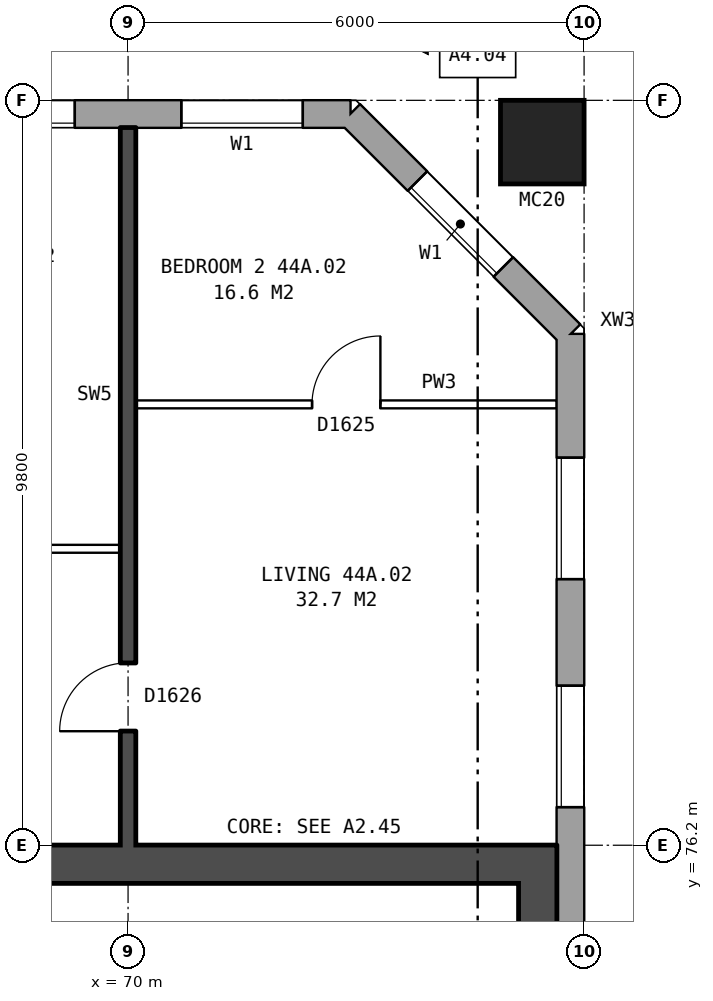
"""IFC4 building model, lengths in metres.
Left out: names, types, materials, properties, quantities, classifications, styles, units other than length and angle.
Written with IfcOpenShell. Run it as: python <this file> out.ifc"""

import sys

from ifc_helpers import new_model, si_unit, direction, frame, frame_2d, origin, origin_2d, place, context, subcontext, project, spatial, rectangle, hollow_rectangle, extrude, element, fill, save


model = new_model("IFC4")
c1 = context("Model", 3, precision=1e-05, world=origin(), true_north=direction((0.0, 1.0)))
c2 = subcontext(c1, "Body", "Model", "MODEL_VIEW")
j1 = project(units=[si_unit("LENGTHUNIT", "METRE"), si_unit("PLANEANGLEUNIT", "RADIAN")], contexts=[c1])
p1 = place(None, origin())
s1 = spatial("IfcSite", under=j1, at=p1, CompositionType="ELEMENT")
p2 = place(p1, origin())
s2 = spatial("IfcBuilding", under=s1, at=p2, CompositionType="ELEMENT")
p3 = place(p2, frame((0.0, 0.0, 157.8)))
s3 = spatial("IfcBuildingStorey", under=s2, at=p3, CompositionType="ELEMENT", Elevation=157.8)
p4 = place(p3, frame((75.45, 85.45, 0.0), z_axis=(0.0, 0.0, 1.0), x_axis=(1.0, 0.0, 0.0)))
e1 = element("IfcColumn", 1, at=p4, inside=s3, PredefinedType="COLUMN", context=c2, shape_type="SweptSolid", body=[
    extrude(hollow_rectangle(XDim=1.1, YDim=1.1, WallThickness=0.06, at=origin_2d()), origin(), (0.0, 0.0, 1.0), 3.1),
])
p5 = place(p3, frame((75.82, 57.075, 0.0), z_axis=(0.0, 0.0, 1.0), x_axis=(0.0, 1.0, 0.0)))
e2 = element("IfcWall", 2, at=p5, inside=s3, PredefinedType="STANDARD", context=c2, shape_type="SweptSolid", body=[
    extrude(rectangle(XDim=25.851, YDim=0.36, at=frame_2d((12.925, 0.0))), origin(), (0.0, 0.0, 1.0), 2.85),
])
p6 = place(p5, frame((1.625, 0.0, 0.8)))
e3 = element("IfcOpeningElement", 3, at=p6, cuts=e2, PredefinedType="OPENING", context=c2, shape_type="SweptSolid", body=[
    extrude(rectangle(XDim=1.6, YDim=1.8, at=frame_2d((0.8, 0.9))), frame((0.0, 0.19, 0.0), z_axis=(0.0, -1.0, 0.0), x_axis=(1.0, 0.0, 0.0)), (0.0, 0.0, 1.0), 0.38),
])
p7 = place(p5, frame((4.625, 0.0, 0.8)))
e4 = element("IfcOpeningElement", 4, at=p7, cuts=e2, PredefinedType="OPENING", context=c2, shape_type="SweptSolid", body=[
    extrude(rectangle(XDim=1.6, YDim=1.8, at=frame_2d((0.8, 0.9))), frame((0.0, 0.19, 0.0), z_axis=(0.0, -1.0, 0.0), x_axis=(1.0, 0.0, 0.0)), (0.0, 0.0, 1.0), 0.38),
])
p8 = place(p5, frame((19.625, 0.0, 0.8)))
e5 = element("IfcOpeningElement", 5, at=p8, cuts=e2, PredefinedType="OPENING", context=c2, shape_type="SweptSolid", body=[
    extrude(rectangle(XDim=1.6, YDim=1.8, at=frame_2d((0.8, 0.9))), frame((0.0, 0.19, 0.0), z_axis=(0.0, -1.0, 0.0), x_axis=(1.0, 0.0, 0.0)), (0.0, 0.0, 1.0), 0.38),
])
p9 = place(p5, frame((22.625, 0.0, 0.8)))
e6 = element("IfcOpeningElement", 6, at=p9, cuts=e2, PredefinedType="OPENING", context=c2, shape_type="SweptSolid", body=[
    extrude(rectangle(XDim=1.6, YDim=1.8, at=frame_2d((0.8, 0.9))), frame((0.0, 0.19, 0.0), z_axis=(0.0, -1.0, 0.0), x_axis=(1.0, 0.0, 0.0)), (0.0, 0.0, 1.0), 0.38),
])
p10 = place(p3, frame((75.82, 82.925, 0.0), z_axis=(0.0, 0.0, 1.0), x_axis=(-0.707106781187, 0.707106781187, 0.0)))
e7 = element("IfcWall", 7, at=p10, inside=s3, PredefinedType="STANDARD", context=c2, shape_type="SweptSolid", body=[
    extrude(rectangle(XDim=4.094, YDim=0.36, at=frame_2d((2.047, 0.0))), origin(), (0.0, 0.0, 1.0), 2.85),
])
p11 = place(p10, frame((1.247, 0.0, 0.8)))
e8 = element("IfcOpeningElement", 8, at=p11, cuts=e7, PredefinedType="OPENING", context=c2, shape_type="SweptSolid", body=[
    extrude(rectangle(XDim=1.6, YDim=1.8, at=frame_2d((0.8, 0.9))), frame((0.0, 0.19, 0.0), z_axis=(0.0, -1.0, 0.0), x_axis=(1.0, 0.0, 0.0)), (0.0, 0.0, 1.0), 0.38),
])
p12 = place(p3, frame((72.925, 85.82, 0.0), z_axis=(0.0, 0.0, 1.0), x_axis=(-1.0, 0.0, 0.0)))
e9 = element("IfcWall", 9, at=p12, inside=s3, PredefinedType="STANDARD", context=c2, shape_type="SweptSolid", body=[
    extrude(rectangle(XDim=41.351, YDim=0.36, at=frame_2d((20.675, 0.0))), origin(), (0.0, 0.0, 1.0), 2.85),
])
p13 = place(p12, frame((0.625, 0.0, 0.8)))
e10 = element("IfcOpeningElement", 10, at=p13, cuts=e9, PredefinedType="OPENING", context=c2, shape_type="SweptSolid", body=[
    extrude(rectangle(XDim=1.6, YDim=1.8, at=frame_2d((0.8, 0.9))), frame((0.0, 0.19, 0.0), z_axis=(0.0, -1.0, 0.0), x_axis=(1.0, 0.0, 0.0)), (0.0, 0.0, 1.0), 0.38),
])
p14 = place(p12, frame((3.625, 0.0, 0.8)))
e11 = element("IfcOpeningElement", 11, at=p14, cuts=e9, PredefinedType="OPENING", context=c2, shape_type="SweptSolid", body=[
    extrude(rectangle(XDim=1.6, YDim=1.8, at=frame_2d((0.8, 0.9))), frame((0.0, 0.19, 0.0), z_axis=(0.0, -1.0, 0.0), x_axis=(1.0, 0.0, 0.0)), (0.0, 0.0, 1.0), 0.38),
])
p15 = place(p12, frame((6.625, 0.0, 0.8)))
e12 = element("IfcOpeningElement", 12, at=p15, cuts=e9, PredefinedType="OPENING", context=c2, shape_type="SweptSolid", body=[
    extrude(rectangle(XDim=1.6, YDim=1.8, at=frame_2d((0.8, 0.9))), frame((0.0, 0.19, 0.0), z_axis=(0.0, -1.0, 0.0), x_axis=(1.0, 0.0, 0.0)), (0.0, 0.0, 1.0), 0.38),
])
p16 = place(p12, frame((9.125, 0.0, 0.8)))
e13 = element("IfcOpeningElement", 13, at=p16, cuts=e9, PredefinedType="OPENING", context=c2, shape_type="SweptSolid", body=[
    extrude(rectangle(XDim=0.6, YDim=1.8, at=frame_2d((0.3, 0.9))), frame((0.0, 0.19, 0.0), z_axis=(0.0, -1.0, 0.0), x_axis=(1.0, 0.0, 0.0)), (0.0, 0.0, 1.0), 0.38),
])
p17 = place(p12, frame((12.125, 0.0, 0.8)))
e14 = element("IfcOpeningElement", 14, at=p17, cuts=e9, PredefinedType="OPENING", context=c2, shape_type="SweptSolid", body=[
    extrude(rectangle(XDim=0.8, YDim=0.9, at=frame_2d((0.4, 0.45))), frame((0.0, 0.19, 0.0), z_axis=(0.0, -1.0, 0.0), x_axis=(1.0, 0.0, 0.0)), (0.0, 0.0, 1.0), 0.38),
])
p18 = place(p12, frame((15.625, 0.0, 0.8)))
e15 = element("IfcOpeningElement", 15, at=p18, cuts=e9, PredefinedType="OPENING", context=c2, shape_type="SweptSolid", body=[
    extrude(rectangle(XDim=1.6, YDim=1.8, at=frame_2d((0.8, 0.9))), frame((0.0, 0.19, 0.0), z_axis=(0.0, -1.0, 0.0), x_axis=(1.0, 0.0, 0.0)), (0.0, 0.0, 1.0), 0.38),
])
p19 = place(p12, frame((18.625, 0.0, 0.8)))
e16 = element("IfcOpeningElement", 16, at=p19, cuts=e9, PredefinedType="OPENING", context=c2, shape_type="SweptSolid", body=[
    extrude(rectangle(XDim=1.6, YDim=1.8, at=frame_2d((0.8, 0.9))), frame((0.0, 0.19, 0.0), z_axis=(0.0, -1.0, 0.0), x_axis=(1.0, 0.0, 0.0)), (0.0, 0.0, 1.0), 0.38),
])
p20 = place(p12, frame((21.625, 0.0, 0.8)))
e17 = element("IfcOpeningElement", 17, at=p20, cuts=e9, PredefinedType="OPENING", context=c2, shape_type="SweptSolid", body=[
    extrude(rectangle(XDim=1.6, YDim=1.8, at=frame_2d((0.8, 0.9))), frame((0.0, 0.19, 0.0), z_axis=(0.0, -1.0, 0.0), x_axis=(1.0, 0.0, 0.0)), (0.0, 0.0, 1.0), 0.38),
])
p21 = place(p12, frame((24.625, 0.0, 0.8)))
e18 = element("IfcOpeningElement", 18, at=p21, cuts=e9, PredefinedType="OPENING", context=c2, shape_type="SweptSolid", body=[
    extrude(rectangle(XDim=1.6, YDim=1.8, at=frame_2d((0.8, 0.9))), frame((0.0, 0.19, 0.0), z_axis=(0.0, -1.0, 0.0), x_axis=(1.0, 0.0, 0.0)), (0.0, 0.0, 1.0), 0.38),
])
p22 = place(p12, frame((27.125, 0.0, 0.8)))
e19 = element("IfcOpeningElement", 19, at=p22, cuts=e9, PredefinedType="OPENING", context=c2, shape_type="SweptSolid", body=[
    extrude(rectangle(XDim=0.8, YDim=1.8, at=frame_2d((0.4, 0.9))), frame((0.0, 0.19, 0.0), z_axis=(0.0, -1.0, 0.0), x_axis=(1.0, 0.0, 0.0)), (0.0, 0.0, 1.0), 0.38),
])
p23 = place(p12, frame((28.225, 0.0, 0.8)))
e20 = element("IfcOpeningElement", 20, at=p23, cuts=e9, PredefinedType="OPENING", context=c2, shape_type="SweptSolid", body=[
    extrude(rectangle(XDim=1.0, YDim=0.9, at=frame_2d((0.5, 0.45))), frame((0.0, 0.19, 0.0), z_axis=(0.0, -1.0, 0.0), x_axis=(1.0, 0.0, 0.0)), (0.0, 0.0, 1.0), 0.38),
])
p24 = place(p12, frame((33.625, 0.0, 0.8)))
e21 = element("IfcOpeningElement", 21, at=p24, cuts=e9, PredefinedType="OPENING", context=c2, shape_type="SweptSolid", body=[
    extrude(rectangle(XDim=1.6, YDim=1.8, at=frame_2d((0.8, 0.9))), frame((0.0, 0.19, 0.0), z_axis=(0.0, -1.0, 0.0), x_axis=(1.0, 0.0, 0.0)), (0.0, 0.0, 1.0), 0.38),
])
p25 = place(p12, frame((36.625, 0.0, 0.8)))
e22 = element("IfcOpeningElement", 22, at=p25, cuts=e9, PredefinedType="OPENING", context=c2, shape_type="SweptSolid", body=[
    extrude(rectangle(XDim=1.6, YDim=1.8, at=frame_2d((0.8, 0.9))), frame((0.0, 0.19, 0.0), z_axis=(0.0, -1.0, 0.0), x_axis=(1.0, 0.0, 0.0)), (0.0, 0.0, 1.0), 0.38),
])
p26 = place(p12, frame((10.025, 0.0, 1.7)))
e23 = element("IfcOpeningElement", 23, at=p26, cuts=e9, PredefinedType="OPENING", context=c2, shape_type="SweptSolid", body=[
    extrude(rectangle(XDim=0.8, YDim=0.9, at=frame_2d((0.4, 0.45))), frame((0.0, 0.19, 0.0), z_axis=(0.0, -1.0, 0.0), x_axis=(1.0, 0.0, 0.0)), (0.0, 0.0, 1.0), 0.38),
])
p27 = place(p12, frame((13.275, 0.0, 0.8)))
e24 = element("IfcOpeningElement", 24, at=p27, cuts=e9, PredefinedType="OPENING", context=c2, shape_type="SweptSolid", body=[
    extrude(rectangle(XDim=1.4, YDim=1.8, at=frame_2d((0.7, 0.9))), frame((0.0, 0.19, 0.0), z_axis=(0.0, -1.0, 0.0), x_axis=(1.0, 0.0, 0.0)), (0.0, 0.0, 1.0), 0.38),
])
p28 = place(p12, frame((30.475, 0.0, 1.7)))
e25 = element("IfcOpeningElement", 25, at=p28, cuts=e9, PredefinedType="OPENING", context=c2, shape_type="SweptSolid", body=[
    extrude(rectangle(XDim=0.8, YDim=0.9, at=frame_2d((0.4, 0.45))), frame((0.0, 0.19, 0.0), z_axis=(0.0, -1.0, 0.0), x_axis=(1.0, 0.0, 0.0)), (0.0, 0.0, 1.0), 0.38),
])
p29 = place(p12, frame((31.625, 0.0, 0.8)))
e26 = element("IfcOpeningElement", 26, at=p29, cuts=e9, PredefinedType="OPENING", context=c2, shape_type="SweptSolid", body=[
    extrude(rectangle(XDim=1.0, YDim=1.8, at=frame_2d((0.5, 0.9))), frame((0.0, 0.19, 0.0), z_axis=(0.0, -1.0, 0.0), x_axis=(1.0, 0.0, 0.0)), (0.0, 0.0, 1.0), 0.38),
])
p30 = place(p3, frame((75.39, 63.8, 0.0), z_axis=(0.0, 0.0, 1.0), x_axis=(0.0, 1.0, 0.0)))
e27 = element("IfcWall", 27, at=p30, inside=s3, PredefinedType="SHEAR", context=c2, shape_type="SweptSolid", body=[
    extrude(rectangle(XDim=12.4, YDim=0.5, at=frame_2d((6.2, 0.0))), origin(), (0.0, 0.0, 1.0), 2.85),
])
p31 = place(p3, frame((67.14, 75.95, 0.0), z_axis=(0.0, 0.0, 1.0), x_axis=(1.0, 0.0, 0.0)))
e28 = element("IfcWall", 28, at=p31, inside=s3, PredefinedType="SHEAR", context=c2, shape_type="SweptSolid", body=[
    extrude(rectangle(XDim=8.0, YDim=0.5, at=frame_2d((4.0, 0.0))), origin(), (0.0, 0.0, 1.0), 2.85),
])
p32 = place(p3, frame((64.1, 80.1, 0.0), z_axis=(0.0, 0.0, 1.0), x_axis=(1.0, 0.0, 0.0)))
e29 = element("IfcWall", 29, at=p32, inside=s3, PredefinedType="PARTITIONING", context=c2, shape_type="SweptSolid", body=[
    extrude(rectangle(XDim=5.8, YDim=0.1, at=frame_2d((2.9, 0.0))), origin(), (0.0, 0.0, 1.0), 2.85),
])
p33 = place(p32, frame((3.6, 0.0, 0.0)))
e30 = element("IfcOpeningElement", 30, at=p33, cuts=e29, PredefinedType="OPENING", context=c2, shape_type="SweptSolid", body=[
    extrude(rectangle(XDim=0.9, YDim=2.1, at=frame_2d((0.45, 1.05))), frame((0.0, 0.06, 0.0), z_axis=(0.0, -1.0, 0.0), x_axis=(1.0, 0.0, 0.0)), (0.0, 0.0, 1.0), 0.12),
])
p34 = place(p32, frame((0.7, 0.0, 0.0)))
e31 = element("IfcOpeningElement", 31, at=p34, cuts=e29, PredefinedType="OPENING", context=c2, shape_type="SweptSolid", body=[
    extrude(rectangle(XDim=0.9, YDim=2.1, at=frame_2d((0.45, 1.05))), frame((0.0, 0.06, 0.0), z_axis=(0.0, -1.0, 0.0), x_axis=(1.0, 0.0, 0.0)), (0.0, 0.0, 1.0), 0.12),
])
p35 = place(p3, frame((70.1, 82.0, 0.0), z_axis=(0.0, 0.0, 1.0), x_axis=(1.0, 0.0, 0.0)))
e32 = element("IfcWall", 32, at=p35, inside=s3, PredefinedType="PARTITIONING", context=c2, shape_type="SweptSolid", body=[
    extrude(rectangle(XDim=5.54, YDim=0.1, at=frame_2d((2.77, 0.0))), origin(), (0.0, 0.0, 1.0), 2.85),
])
p36 = place(p35, frame((2.32, 0.0, 0.0)))
e33 = element("IfcOpeningElement", 33, at=p36, cuts=e32, PredefinedType="OPENING", context=c2, shape_type="SweptSolid", body=[
    extrude(rectangle(XDim=0.9, YDim=2.1, at=frame_2d((0.45, 1.05))), frame((0.0, 0.06, 0.0), z_axis=(0.0, -1.0, 0.0), x_axis=(1.0, 0.0, 0.0)), (0.0, 0.0, 1.0), 0.12),
])
p37 = place(p3, frame((70.0, 76.2, 0.0), z_axis=(0.0, 0.0, 1.0), x_axis=(0.0, 1.0, 0.0)))
e34 = element("IfcWall", 34, at=p37, inside=s3, PredefinedType="SOLIDWALL", context=c2, shape_type="SweptSolid", body=[
    extrude(rectangle(XDim=9.44, YDim=0.2, at=frame_2d((4.72, 0.0))), origin(), (0.0, 0.0, 1.0), 2.85),
])
p38 = place(p37, frame((1.5, 0.0, 0.0)))
e35 = element("IfcOpeningElement", 35, at=p38, cuts=e34, PredefinedType="OPENING", context=c2, shape_type="SweptSolid", body=[
    extrude(rectangle(XDim=0.9, YDim=2.1, at=frame_2d((0.45, 1.05))), frame((0.0, 0.11, 0.0), z_axis=(0.0, -1.0, 0.0), x_axis=(1.0, 0.0, 0.0)), (0.0, 0.0, 1.0), 0.22),
])
p39 = place(p8, origin())
e36 = element("IfcWindow", 36, at=p39, inside=s3, PartitioningType="SINGLE_PANEL", PredefinedType="WINDOW", context=c2, shape_type="SweptSolid", body=[
    extrude(rectangle(XDim=1.6, YDim=1.8, at=frame_2d((0.8, 0.9))), frame((0.0, 0.15, 0.0), z_axis=(0.0, -1.0, 0.0), x_axis=(1.0, 0.0, 0.0)), (0.0, 0.0, 1.0), 0.06),
])
fill(e5, e36)
p40 = place(p9, origin())
e37 = element("IfcWindow", 37, at=p40, inside=s3, PartitioningType="SINGLE_PANEL", PredefinedType="WINDOW", context=c2, shape_type="SweptSolid", body=[
    extrude(rectangle(XDim=1.6, YDim=1.8, at=frame_2d((0.8, 0.9))), frame((0.0, 0.15, 0.0), z_axis=(0.0, -1.0, 0.0), x_axis=(1.0, 0.0, 0.0)), (0.0, 0.0, 1.0), 0.06),
])
fill(e6, e37)
p41 = place(p11, origin())
e38 = element("IfcWindow", 38, at=p41, inside=s3, PartitioningType="SINGLE_PANEL", PredefinedType="WINDOW", context=c2, shape_type="SweptSolid", body=[
    extrude(rectangle(XDim=1.6, YDim=1.8, at=frame_2d((0.8, 0.9))), frame((0.0, 0.15, 0.0), z_axis=(0.0, -1.0, 0.0), x_axis=(1.0, 0.0, 0.0)), (0.0, 0.0, 1.0), 0.06),
])
fill(e8, e38)
p42 = place(p13, origin())
e39 = element("IfcWindow", 39, at=p42, inside=s3, PartitioningType="SINGLE_PANEL", PredefinedType="WINDOW", context=c2, shape_type="SweptSolid", body=[
    extrude(rectangle(XDim=1.6, YDim=1.8, at=frame_2d((0.8, 0.9))), frame((0.0, 0.15, 0.0), z_axis=(0.0, -1.0, 0.0), x_axis=(1.0, 0.0, 0.0)), (0.0, 0.0, 1.0), 0.06),
])
fill(e10, e39)
p43 = place(p14, origin())
e40 = element("IfcWindow", 40, at=p43, inside=s3, PartitioningType="SINGLE_PANEL", PredefinedType="WINDOW", context=c2, shape_type="SweptSolid", body=[
    extrude(rectangle(XDim=1.6, YDim=1.8, at=frame_2d((0.8, 0.9))), frame((0.0, 0.15, 0.0), z_axis=(0.0, -1.0, 0.0), x_axis=(1.0, 0.0, 0.0)), (0.0, 0.0, 1.0), 0.06),
])
fill(e11, e40)
p44 = place(p36, origin())
e41 = element("IfcDoor", 41, at=p44, inside=s3, OperationType="SINGLE_SWING_RIGHT", PredefinedType="DOOR", context=c2, shape_type="SweptSolid", body=[
    extrude(rectangle(XDim=0.9, YDim=2.1, at=frame_2d((0.45, 1.05))), frame((0.0, 0.025, 0.0), z_axis=(0.0, -1.0, 0.0), x_axis=(1.0, 0.0, 0.0)), (0.0, 0.0, 1.0), 0.05),
])
fill(e33, e41)
p45 = place(p38, origin())
e42 = element("IfcDoor", 42, at=p45, inside=s3, OperationType="SINGLE_SWING_LEFT", PredefinedType="DOOR", context=c2, shape_type="SweptSolid", body=[
    extrude(rectangle(XDim=0.9, YDim=2.1, at=frame_2d((0.45, 1.05))), frame((0.0, 0.025, 0.0), z_axis=(0.0, -1.0, 0.0), x_axis=(1.0, 0.0, 0.0)), (0.0, 0.0, 1.0), 0.05),
])
fill(e35, e42)
save(model, sys.argv[1])
